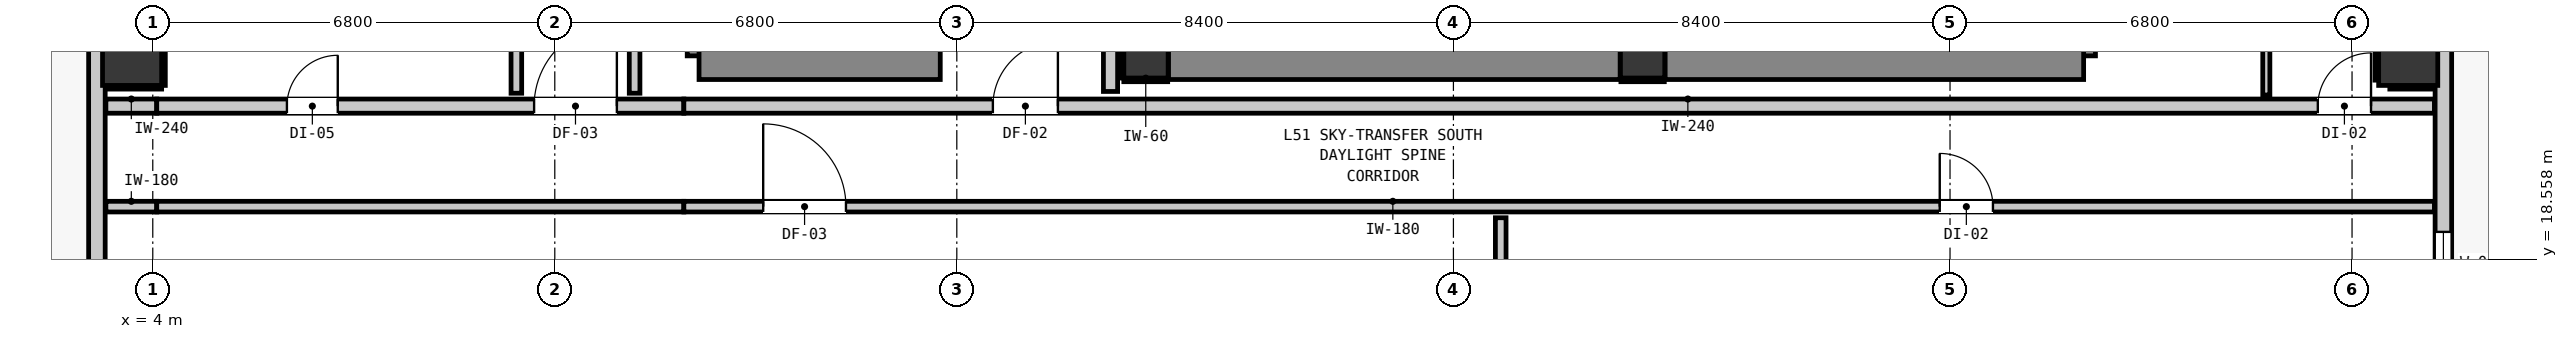
"""IFC4 building model, lengths in metres.
Left out: names, types, materials, properties, quantities, classifications, styles, units other than length and angle.
Written with IfcOpenShell. Run it as: python <this file> out.ifc"""

import sys

from ifc_helpers import new_model, si_unit, direction, frame, frame_2d, origin, origin_2d, place, context, subcontext, project, spatial, rectangle, extrude, element, fill, save


model = new_model("IFC4")
c1 = context("Model", 3, precision=1e-05, world=origin(), true_north=direction((0.0, 1.0)))
c2 = subcontext(c1, "Body", "Model", "MODEL_VIEW")
j1 = project(units=[si_unit("LENGTHUNIT", "METRE"), si_unit("PLANEANGLEUNIT", "RADIAN")], contexts=[c1])
p1 = place(None, origin())
s1 = spatial("IfcSite", under=j1, at=p1, CompositionType="ELEMENT")
p2 = place(p1, origin())
s2 = spatial("IfcBuilding", under=s1, at=p2, CompositionType="ELEMENT")
p3 = place(p2, frame((0.0, 0.0, 176.88)))
s3 = spatial("IfcBuildingStorey", under=s2, at=p3, CompositionType="ELEMENT", Elevation=176.88)
for number, where, z_axis, x_axis in (
    (1, (20.8, 22.0, 0.0), (0.0, 0.0, 1.0), (1.0, 0.0, 0.0)),
    (2, (29.2, 22.0, 0.0), (0.0, 0.0, 1.0), (1.0, 0.0, 0.0)),
):
    element("IfcColumn", number, at=place(p3, frame(where, z_axis=z_axis, x_axis=x_axis)), inside=s3, PredefinedType="COLUMN", context=c2, shape_type="SweptSolid", body=[
        extrude(rectangle(XDim=0.75, YDim=0.75, at=origin_2d()), origin(), (0.0, 0.0, 1.0), 3.32),
    ])
p4 = place(p3, frame((13.44, 22.0, 0.0), z_axis=(0.0, 0.0, 1.0), x_axis=(0.0, 1.0, 0.0)))
e3 = element("IfcWall", 3, at=p4, inside=s3, PredefinedType="SHEAR", context=c2, shape_type="SweptSolid", body=[
    extrude(rectangle(XDim=8.32, YDim=0.8, at=frame_2d((4.16, 0.0))), origin(), (0.0, 0.0, 1.0), 3.32),
])
p5 = place(p3, frame((13.24, 22.0, 0.0), z_axis=(0.0, 0.0, 1.0), x_axis=(1.0, 0.0, 0.0)))
e4 = element("IfcWall", 4, at=p5, inside=s3, PredefinedType="SHEAR", context=c2, shape_type="SweptSolid", body=[
    extrude(rectangle(XDim=4.08, YDim=0.8, at=frame_2d((2.04, 0.0))), origin(), (0.0, 0.0, 1.0), 3.32),
])
p6 = place(p3, frame((36.46, 22.0, 0.0), z_axis=(0.0, 0.0, 1.0), x_axis=(0.0, 1.0, 0.0)))
e5 = element("IfcWall", 5, at=p6, inside=s3, PredefinedType="SHEAR", context=c2, shape_type="SweptSolid", body=[
    extrude(rectangle(XDim=8.32, YDim=0.8, at=frame_2d((4.16, 0.0))), origin(), (0.0, 0.0, 1.0), 3.32),
])
p7 = place(p3, frame((29.58, 22.0, 0.0), z_axis=(0.0, 0.0, 1.0), x_axis=(1.0, 0.0, 0.0)))
e6 = element("IfcWall", 6, at=p7, inside=s3, PredefinedType="SHEAR", context=c2, shape_type="SweptSolid", body=[
    extrude(rectangle(XDim=7.08, YDim=0.8, at=frame_2d((3.54, 0.0))), origin(), (0.0, 0.0, 1.0), 3.32),
])
p8 = place(p3, frame((21.18, 22.0, 0.0), z_axis=(0.0, 0.0, 1.0), x_axis=(1.0, 0.0, 0.0)))
e7 = element("IfcWall", 7, at=p8, inside=s3, PredefinedType="SHEAR", context=c2, shape_type="SweptSolid", body=[
    extrude(rectangle(XDim=7.64, YDim=0.8, at=frame_2d((3.82, 0.0))), origin(), (0.0, 0.0, 1.0), 3.32),
])
for number, where, z_axis, x_axis in (
    (8, (3.65, 22.0, 0.0), (0.0, 0.0, 1.0), (1.0, 0.0, 0.0)),
    (9, (42.15, 22.0, 0.0), (0.0, 0.0, 1.0), (1.0, 0.0, 0.0)),
):
    element("IfcColumn", number, at=place(p3, frame(where, z_axis=z_axis, x_axis=x_axis)), inside=s3, PredefinedType="COLUMN", context=c2, shape_type="SweptSolid", body=[
        extrude(rectangle(XDim=1.0, YDim=1.0, at=origin_2d()), origin(), (0.0, 0.0, 1.0), 3.32),
    ])
p9 = place(p3, frame((3.055, 17.555, 0.0), z_axis=(0.0, 0.0, 1.0), x_axis=(0.0, 1.0, 0.0)))
e10 = element("IfcWall", 10, at=p9, inside=s3, PredefinedType="STANDARD", context=c2, shape_type="SweptSolid", body=[
    extrude(rectangle(XDim=32.29, YDim=0.28, at=frame_2d((16.145, 0.0))), origin(), (0.0, 0.0, 1.0), 3.08),
])
p10 = place(p9, frame((29.684, 0.0, 0.0)))
e11 = element("IfcOpeningElement", 11, at=p10, cuts=e10, PredefinedType="OPENING", context=c2, shape_type="SweptSolid", body=[
    extrude(rectangle(XDim=1.0, YDim=2.15, at=frame_2d((0.5, 1.075))), frame((0.0, 0.15, 0.0), z_axis=(0.0, -1.0, 0.0), x_axis=(1.0, 0.0, 0.0)), (0.0, 0.0, 1.0), 0.3),
])
p11 = place(p9, frame((31.092, 0.0, 0.85)))
e12 = element("IfcOpeningElement", 12, at=p11, cuts=e10, PredefinedType="OPENING", context=c2, shape_type="SweptSolid", body=[
    extrude(rectangle(XDim=0.9, YDim=1.5, at=frame_2d((0.45, 0.75))), frame((0.0, 0.15, 0.0), z_axis=(0.0, -1.0, 0.0), x_axis=(1.0, 0.0, 0.0)), (0.0, 0.0, 1.0), 0.3),
])
p12 = place(p3, frame((42.745, 49.845, 0.0), z_axis=(0.0, 0.0, 1.0), x_axis=(0.0, -1.0, 0.0)))
e13 = element("IfcWall", 13, at=p12, inside=s3, PredefinedType="STANDARD", context=c2, shape_type="SweptSolid", body=[
    extrude(rectangle(XDim=32.29, YDim=0.28, at=frame_2d((16.145, 0.0))), origin(), (0.0, 0.0, 1.0), 3.08),
])
p13 = place(p12, frame((0.904, 0.0, 0.0)))
e14 = element("IfcOpeningElement", 14, at=p13, cuts=e13, PredefinedType="OPENING", context=c2, shape_type="SweptSolid", body=[
    extrude(rectangle(XDim=1.0, YDim=2.15, at=frame_2d((0.5, 1.075))), frame((0.0, 0.15, 0.0), z_axis=(0.0, -1.0, 0.0), x_axis=(1.0, 0.0, 0.0)), (0.0, 0.0, 1.0), 0.3),
])
p14 = place(p12, frame((30.822, 0.0, 0.85)))
e15 = element("IfcOpeningElement", 15, at=p14, cuts=e13, PredefinedType="OPENING", context=c2, shape_type="SweptSolid", body=[
    extrude(rectangle(XDim=1.05, YDim=1.65, at=frame_2d((0.525, 0.825))), frame((0.0, 0.15, 0.0), z_axis=(0.0, -1.0, 0.0), x_axis=(1.0, 0.0, 0.0)), (0.0, 0.0, 1.0), 0.3),
])
p15 = place(p12, frame((13.595, 0.0, 0.85)))
e16 = element("IfcOpeningElement", 16, at=p15, cuts=e13, PredefinedType="OPENING", context=c2, shape_type="SweptSolid", body=[
    extrude(rectangle(XDim=2.4, YDim=1.95, at=frame_2d((1.2, 0.975))), frame((0.0, 0.15, 0.0), z_axis=(0.0, -1.0, 0.0), x_axis=(1.0, 0.0, 0.0)), (0.0, 0.0, 1.0), 0.3),
])
p16 = place(p3, frame((3.207, 21.15, 0.0), z_axis=(0.0, 0.0, 1.0), x_axis=(1.0, 0.0, 0.0)))
e17 = element("IfcWall", 17, at=p16, inside=s3, PredefinedType="PARTITIONING", context=c2, shape_type="SweptSolid", body=[
    extrude(rectangle(XDim=0.86, YDim=0.24, at=frame_2d((0.43, 0.0))), origin(), (0.0, 0.0, 1.0), 3.08),
])
p17 = place(p3, frame((4.067, 21.15, 0.0), z_axis=(0.0, 0.0, 1.0), x_axis=(1.0, 0.0, 0.0)))
e18 = element("IfcWall", 18, at=p17, inside=s3, PredefinedType="PARTITIONING", context=c2, shape_type="SweptSolid", body=[
    extrude(rectangle(XDim=8.916, YDim=0.24, at=frame_2d((4.458, 0.0))), origin(), (0.0, 0.0, 1.0), 2.565),
])
p18 = place(p17, frame((6.383, 0.0, 0.0)))
e19 = element("IfcOpeningElement", 19, at=p18, cuts=e18, PredefinedType="OPENING", context=c2, shape_type="SweptSolid", body=[
    extrude(rectangle(XDim=1.4, YDim=2.15, at=frame_2d((0.7, 1.075))), frame((0.0, 0.13, 0.0), z_axis=(0.0, -1.0, 0.0), x_axis=(1.0, 0.0, 0.0)), (0.0, 0.0, 1.0), 0.26),
])
p19 = place(p17, frame((2.202, 0.0, 0.0)))
e20 = element("IfcOpeningElement", 20, at=p19, cuts=e18, PredefinedType="OPENING", context=c2, shape_type="SweptSolid", body=[
    extrude(rectangle(XDim=0.86, YDim=2.02, at=frame_2d((0.43, 1.01))), frame((0.0, 0.13, 0.0), z_axis=(0.0, -1.0, 0.0), x_axis=(1.0, 0.0, 0.0)), (0.0, 0.0, 1.0), 0.26),
])
p20 = place(p3, frame((12.983, 21.15, 0.0), z_axis=(0.0, 0.0, 1.0), x_axis=(1.0, 0.0, 0.0)))
e21 = element("IfcWall", 21, at=p20, inside=s3, PredefinedType="PARTITIONING", context=c2, shape_type="SweptSolid", body=[
    extrude(rectangle(XDim=29.61, YDim=0.24, at=frame_2d((14.805, 0.0))), origin(), (0.0, 0.0, 1.0), 3.08),
])
p21 = place(p20, frame((5.227, 0.0, 0.0)))
e22 = element("IfcOpeningElement", 22, at=p21, cuts=e21, PredefinedType="OPENING", context=c2, shape_type="SweptSolid", body=[
    extrude(rectangle(XDim=1.1, YDim=2.15, at=frame_2d((0.55, 1.075))), frame((0.0, 0.13, 0.0), z_axis=(0.0, -1.0, 0.0), x_axis=(1.0, 0.0, 0.0)), (0.0, 0.0, 1.0), 0.26),
])
p22 = place(p20, frame((27.638, 0.0, 0.0)))
e23 = element("IfcOpeningElement", 23, at=p22, cuts=e21, PredefinedType="OPENING", context=c2, shape_type="SweptSolid", body=[
    extrude(rectangle(XDim=0.9, YDim=2.1, at=frame_2d((0.45, 1.05))), frame((0.0, 0.13, 0.0), z_axis=(0.0, -1.0, 0.0), x_axis=(1.0, 0.0, 0.0)), (0.0, 0.0, 1.0), 0.26),
])
p23 = place(p3, frame((3.207, 19.45, 0.0), z_axis=(0.0, 0.0, 1.0), x_axis=(1.0, 0.0, 0.0)))
e24 = element("IfcWall", 24, at=p23, inside=s3, PredefinedType="PARTITIONING", context=c2, shape_type="SweptSolid", body=[
    extrude(rectangle(XDim=0.86, YDim=0.18, at=frame_2d((0.43, 0.0))), origin(), (0.0, 0.0, 1.0), 3.08),
])
p24 = place(p3, frame((4.067, 19.45, 0.0), z_axis=(0.0, 0.0, 1.0), x_axis=(1.0, 0.0, 0.0)))
e25 = element("IfcWall", 25, at=p24, inside=s3, PredefinedType="PARTITIONING", context=c2, shape_type="SweptSolid", body=[
    extrude(rectangle(XDim=8.916, YDim=0.18, at=frame_2d((4.458, 0.0))), origin(), (0.0, 0.0, 1.0), 2.565),
])
p25 = place(p3, frame((12.983, 19.45, 0.0), z_axis=(0.0, 0.0, 1.0), x_axis=(1.0, 0.0, 0.0)))
e26 = element("IfcWall", 26, at=p25, inside=s3, PredefinedType="PARTITIONING", context=c2, shape_type="SweptSolid", body=[
    extrude(rectangle(XDim=29.61, YDim=0.18, at=frame_2d((14.805, 0.0))), origin(), (0.0, 0.0, 1.0), 3.08),
])
p26 = place(p25, frame((1.342, 0.0, 0.0)))
e27 = element("IfcOpeningElement", 27, at=p26, cuts=e26, PredefinedType="OPENING", context=c2, shape_type="SweptSolid", body=[
    extrude(rectangle(XDim=1.4, YDim=2.15, at=frame_2d((0.7, 1.075))), frame((0.0, 0.1, 0.0), z_axis=(0.0, -1.0, 0.0), x_axis=(1.0, 0.0, 0.0)), (0.0, 0.0, 1.0), 0.2),
])
p27 = place(p25, frame((21.243, 0.0, 0.0)))
e28 = element("IfcOpeningElement", 28, at=p27, cuts=e26, PredefinedType="OPENING", context=c2, shape_type="SweptSolid", body=[
    extrude(rectangle(XDim=0.9, YDim=2.1, at=frame_2d((0.45, 1.05))), frame((0.0, 0.1, 0.0), z_axis=(0.0, -1.0, 0.0), x_axis=(1.0, 0.0, 0.0)), (0.0, 0.0, 1.0), 0.2),
])
p28 = place(p3, frame((20.2, 21.398, 0.0), z_axis=(0.0, 0.0, 1.0), x_axis=(0.0, 1.0, 0.0)))
e29 = element("IfcWall", 29, at=p28, inside=s3, PredefinedType="PARTITIONING", context=c2, shape_type="SweptSolid", body=[
    extrude(rectangle(XDim=6.754, YDim=0.24, at=frame_2d((3.377, 0.0))), origin(), (0.0, 0.0, 1.0), 3.08),
])
p29 = place(p3, frame((10.15, 21.368, 0.0), z_axis=(0.0, 0.0, 1.0), x_axis=(0.0, 1.0, 0.0)))
e30 = element("IfcWall", 30, at=p29, inside=s3, PredefinedType="PARTITIONING", context=c2, shape_type="SweptSolid", body=[
    extrude(rectangle(XDim=5.264, YDim=0.18, at=frame_2d((2.632, 0.0))), origin(), (0.0, 0.0, 1.0), 3.08),
])
p30 = place(p3, frame((12.15, 21.368, 0.0), z_axis=(0.0, 0.0, 1.0), x_axis=(0.0, 1.0, 0.0)))
e31 = element("IfcWall", 31, at=p30, inside=s3, PredefinedType="PARTITIONING", context=c2, shape_type="SweptSolid", body=[
    extrude(rectangle(XDim=18.694, YDim=0.18, at=frame_2d((9.347, 0.0))), origin(), (0.0, 0.0, 1.0), 3.08),
])
p31 = place(p3, frame((26.8, 15.407, 0.0), z_axis=(0.0, 0.0, 1.0), x_axis=(0.0, 1.0, 0.0)))
e32 = element("IfcWall", 32, at=p31, inside=s3, PredefinedType="PARTITIONING", context=c2, shape_type="SweptSolid", body=[
    extrude(rectangle(XDim=3.855, YDim=0.18, at=frame_2d((1.927, 0.0))), origin(), (0.0, 0.0, 1.0), 3.08),
])
p32 = place(p3, frame((39.75, 21.338, 0.0), z_axis=(0.0, 0.0, 1.0), x_axis=(0.0, 1.0, 0.0)))
e33 = element("IfcWall", 33, at=p32, inside=s3, PredefinedType="PARTITIONING", context=c2, shape_type="SweptSolid", body=[
    extrude(rectangle(XDim=18.754, YDim=0.12, at=frame_2d((9.377, 0.0))), origin(), (0.0, 0.0, 1.0), 3.08),
])
p33 = place(p3, frame((20.425, 21.593, 0.0), z_axis=(0.0, 0.0, 1.0), x_axis=(1.0, 0.0, 0.0)))
e34 = element("IfcWall", 34, at=p33, inside=s3, PredefinedType="PARTITIONING", context=c2, shape_type="SweptSolid", body=[
    extrude(rectangle(XDim=0.742, YDim=0.06, at=frame_2d((0.371, 0.0))), origin(), (0.0, 0.0, 1.0), 1.45),
])
p34 = place(p3, frame((20.393, 21.625, 0.0), z_axis=(0.0, 0.0, 1.0), x_axis=(0.0, 1.0, 0.0)))
e35 = element("IfcWall", 35, at=p34, inside=s3, PredefinedType="PARTITIONING", context=c2, shape_type="SweptSolid", body=[
    extrude(rectangle(XDim=0.75, YDim=0.06, at=frame_2d((0.375, 0.0))), origin(), (0.0, 0.0, 1.0), 1.45),
])
p35 = place(p3, frame((28.833, 21.593, 0.0), z_axis=(0.0, 0.0, 1.0), x_axis=(1.0, 0.0, 0.0)))
e36 = element("IfcWall", 36, at=p35, inside=s3, PredefinedType="PARTITIONING", context=c2, shape_type="SweptSolid", body=[
    extrude(rectangle(XDim=0.734, YDim=0.06, at=frame_2d((0.367, 0.0))), origin(), (0.0, 0.0, 1.0), 1.45),
])
p36 = place(p3, frame((3.21, 21.468, 0.0), z_axis=(0.0, 0.0, 1.0), x_axis=(1.0, 0.0, 0.0)))
e37 = element("IfcWall", 37, at=p36, inside=s3, PredefinedType="PARTITIONING", context=c2, shape_type="SweptSolid", body=[
    extrude(rectangle(XDim=0.94, YDim=0.06, at=frame_2d((0.47, 0.0))), origin(), (0.0, 0.0, 1.0), 1.45),
])
p37 = place(p3, frame((4.182, 21.5, 0.0), z_axis=(0.0, 0.0, 1.0), x_axis=(0.0, 1.0, 0.0)))
e38 = element("IfcWall", 38, at=p37, inside=s3, PredefinedType="PARTITIONING", context=c2, shape_type="SweptSolid", body=[
    extrude(rectangle(XDim=1.0, YDim=0.06, at=frame_2d((0.5, 0.0))), origin(), (0.0, 0.0, 1.0), 1.45),
])
p38 = place(p3, frame((41.839, 21.468, 0.0), z_axis=(0.0, 0.0, 1.0), x_axis=(1.0, 0.0, 0.0)))
e39 = element("IfcWall", 39, at=p38, inside=s3, PredefinedType="PARTITIONING", context=c2, shape_type="SweptSolid", body=[
    extrude(rectangle(XDim=0.751, YDim=0.06, at=frame_2d((0.375, 0.0))), origin(), (0.0, 0.0, 1.0), 1.45),
])
p39 = place(p3, frame((41.618, 21.589, 0.0), z_axis=(0.0, 0.0, 1.0), x_axis=(0.0, 1.0, 0.0)))
e40 = element("IfcWall", 40, at=p39, inside=s3, PredefinedType="PARTITIONING", context=c2, shape_type="SweptSolid", body=[
    extrude(rectangle(XDim=0.911, YDim=0.06, at=frame_2d((0.456, 0.0))), origin(), (0.0, 0.0, 1.0), 1.45),
])
p40 = place(p14, origin())
e41 = element("IfcWindow", 41, at=p40, inside=s3, PartitioningType="SINGLE_PANEL", PredefinedType="WINDOW", context=c2, shape_type="SweptSolid", body=[
    extrude(rectangle(XDim=1.05, YDim=1.65, at=frame_2d((0.525, 0.825))), frame((0.0, 0.03, 0.0), z_axis=(0.0, -1.0, 0.0), x_axis=(1.0, 0.0, 0.0)), (0.0, 0.0, 1.0), 0.06),
])
fill(e15, e41)
p41 = place(p21, origin())
e42 = element("IfcDoor", 42, at=p41, inside=s3, OperationType="SINGLE_SWING_RIGHT", PredefinedType="DOOR", context=c2, shape_type="SweptSolid", body=[
    extrude(rectangle(XDim=1.1, YDim=2.15, at=frame_2d((0.55, 1.075))), frame((0.0, 0.025, 0.0), z_axis=(0.0, -1.0, 0.0), x_axis=(1.0, 0.0, 0.0)), (0.0, 0.0, 1.0), 0.05),
])
fill(e22, e42)
p42 = place(p18, origin())
e43 = element("IfcDoor", 43, at=p42, inside=s3, OperationType="SINGLE_SWING_RIGHT", PredefinedType="DOOR", context=c2, shape_type="SweptSolid", body=[
    extrude(rectangle(XDim=1.4, YDim=2.15, at=frame_2d((0.7, 1.075))), frame((0.0, 0.025, 0.0), z_axis=(0.0, -1.0, 0.0), x_axis=(1.0, 0.0, 0.0)), (0.0, 0.0, 1.0), 0.05),
])
fill(e19, e43)
p43 = place(p26, origin())
e44 = element("IfcDoor", 44, at=p43, inside=s3, OperationType="SINGLE_SWING_LEFT", PredefinedType="DOOR", context=c2, shape_type="SweptSolid", body=[
    extrude(rectangle(XDim=1.4, YDim=2.15, at=frame_2d((0.7, 1.075))), frame((0.0, 0.025, 0.0), z_axis=(0.0, -1.0, 0.0), x_axis=(1.0, 0.0, 0.0)), (0.0, 0.0, 1.0), 0.05),
])
fill(e27, e44)
p44 = place(p27, origin())
e45 = element("IfcDoor", 45, at=p44, inside=s3, OperationType="SINGLE_SWING_LEFT", PredefinedType="DOOR", context=c2, shape_type="SweptSolid", body=[
    extrude(rectangle(XDim=0.9, YDim=2.1, at=frame_2d((0.45, 1.05))), frame((0.0, 0.025, 0.0), z_axis=(0.0, -1.0, 0.0), x_axis=(1.0, 0.0, 0.0)), (0.0, 0.0, 1.0), 0.05),
])
fill(e28, e45)
p45 = place(p19, origin())
e46 = element("IfcDoor", 46, at=p45, inside=s3, OperationType="SINGLE_SWING_RIGHT", PredefinedType="DOOR", context=c2, shape_type="SweptSolid", body=[
    extrude(rectangle(XDim=0.86, YDim=2.02, at=frame_2d((0.43, 1.01))), frame((0.0, 0.025, 0.0), z_axis=(0.0, -1.0, 0.0), x_axis=(1.0, 0.0, 0.0)), (0.0, 0.0, 1.0), 0.05),
])
fill(e20, e46)
p46 = place(p22, origin())
e47 = element("IfcDoor", 47, at=p46, inside=s3, OperationType="SINGLE_SWING_RIGHT", PredefinedType="DOOR", context=c2, shape_type="SweptSolid", body=[
    extrude(rectangle(XDim=0.9, YDim=2.1, at=frame_2d((0.45, 1.05))), frame((0.0, 0.025, 0.0), z_axis=(0.0, -1.0, 0.0), x_axis=(1.0, 0.0, 0.0)), (0.0, 0.0, 1.0), 0.05),
])
fill(e23, e47)
save(model, sys.argv[1])
